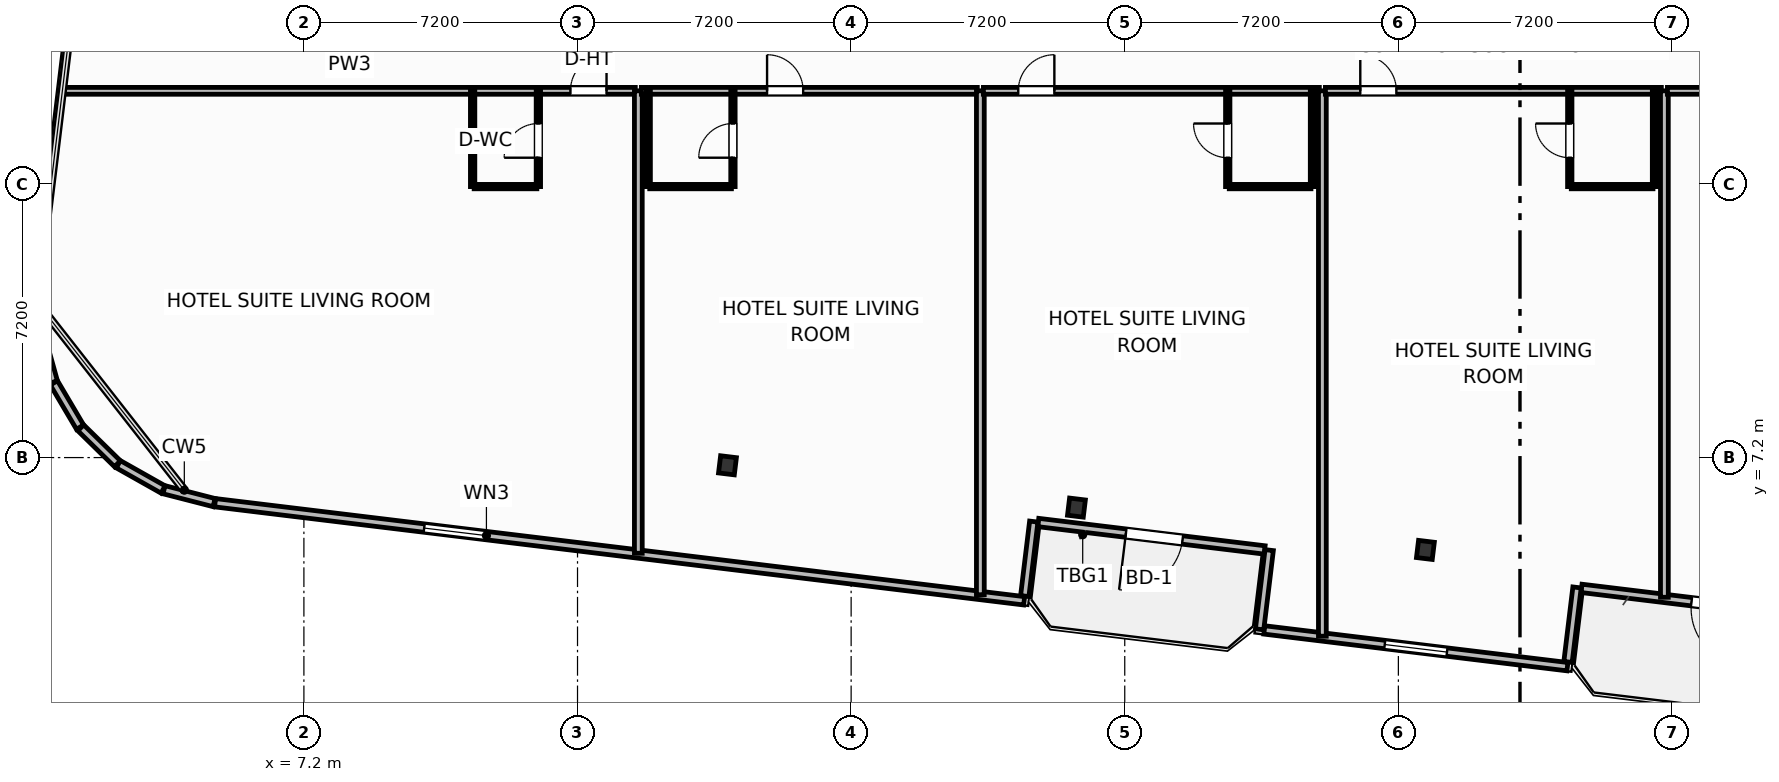
"""IFC4 building model, lengths in metres.
Left out: names, types, materials, properties, quantities, classifications, styles, units other than length and angle.
Written with IfcOpenShell. Run it as: python <this file> out.ifc"""

import sys

from ifc_helpers import new_model, si_unit, direction, frame, frame_2d, origin, origin_2d, place, context, subcontext, project, spatial, rectangle, i_section, extrude, element, fill, save


model = new_model("IFC4")
c1 = context("Model", 3, precision=1e-05, world=origin(), true_north=direction((0.0, 1.0)))
c2 = subcontext(c1, "Body", "Model", "MODEL_VIEW")
j1 = project(units=[si_unit("LENGTHUNIT", "METRE"), si_unit("PLANEANGLEUNIT", "RADIAN")], contexts=[c1])
p1 = place(None, origin())
s1 = spatial("IfcSite", under=j1, at=p1, CompositionType="ELEMENT")
p2 = place(p1, origin())
s2 = spatial("IfcBuilding", under=s1, at=p2, CompositionType="ELEMENT")
p3 = place(p2, frame((0.0, 0.0, 151.3)))
s3 = spatial("IfcBuildingStorey", under=s2, at=p3, CompositionType="ELEMENT", Elevation=151.3)
for number, where, z_axis, x_axis in (
    (1, (18.346, 6.997, 0.0), (0.0, 0.0, 1.0), (0.993, -0.12, 0.0)),
    (2, (27.529, 5.884, 0.0), (0.0, 0.0, 1.0), (0.993, -0.12, 0.0)),
    (3, (36.711, 4.77, 0.0), (0.0, 0.0, 1.0), (0.993, -0.12, 0.0)),
):
    element("IfcColumn", number, at=place(p3, frame(where, z_axis=z_axis, x_axis=x_axis)), inside=s3, PredefinedType="COLUMN", context=c2, shape_type="SweptSolid", body=[
        extrude(i_section(OverallWidth=0.418, OverallDepth=0.455, WebThickness=0.042, FlangeThickness=0.068, FilletRadius=0.025, at=origin_2d()), origin(), (0.0, 0.0, 1.0), 3.7),
    ])
p4 = place(p3, frame((32.48, 4.77, 0.0), z_axis=(0.0, 0.0, 1.0), x_axis=(-0.992735402148, 0.120318000826, 0.0)))
e4 = element("IfcWall", 4, at=p4, inside=s3, PredefinedType="SOLIDWALL", context=c2, shape_type="SweptSolid", body=[
    extrude(rectangle(XDim=6.0, YDim=0.22, at=frame_2d((3.0, 0.0))), origin(), (0.0, 0.0, 1.0), 2.73),
])
p5 = place(p4, frame((2.176, 0.0, 0.0)))
e5 = element("IfcOpeningElement", 5, at=p5, cuts=e4, PredefinedType="OPENING", context=c2, shape_type="SweptSolid", body=[
    extrude(rectangle(XDim=1.5, YDim=2.25, at=frame_2d((0.75, 1.125))), frame((0.0, 0.12, 0.0), z_axis=(0.0, -1.0, 0.0), x_axis=(1.0, 0.0, 0.0)), (0.0, 0.0, 1.0), 0.24),
])
p6 = place(p3, frame((46.776, 3.037, 0.0), z_axis=(0.0, 0.0, 1.0), x_axis=(-0.992735402148, 0.120318000826, 0.0)))
e6 = element("IfcWall", 6, at=p6, inside=s3, PredefinedType="SOLIDWALL", context=c2, shape_type="SweptSolid", body=[
    extrude(rectangle(XDim=6.0, YDim=0.22, at=frame_2d((3.0, 0.0))), origin(), (0.0, 0.0, 1.0), 2.73),
])
p7 = place(p6, frame((1.584, 0.0, 0.0)))
e7 = element("IfcOpeningElement", 7, at=p7, cuts=e6, PredefinedType="OPENING", context=c2, shape_type="SweptSolid", body=[
    extrude(rectangle(XDim=1.5, YDim=2.25, at=frame_2d((0.75, 1.125))), frame((0.0, 0.12, 0.0), z_axis=(0.0, -1.0, 0.0), x_axis=(1.0, 0.0, 0.0)), (0.0, 0.0, 1.0), 0.24),
])
p8 = place(p3, frame((0.245, 10.491, 0.0), z_axis=(0.0, 0.0, 1.0), x_axis=(0.268853470153, -0.963181089716, 0.0)))
e8 = element("IfcWall", 8, at=p8, inside=s3, PredefinedType="SOLIDWALL", context=c2, shape_type="SweptSolid", body=[
    extrude(rectangle(XDim=1.353, YDim=0.22, at=frame_2d((0.677, 0.0))), origin(), (0.0, 0.0, 1.0), 2.73),
])
p9 = place(p3, frame((0.622, 9.166, 0.0), z_axis=(0.0, 0.0, 1.0), x_axis=(0.508911700393, -0.860818727261, 0.0)))
e9 = element("IfcWall", 9, at=p9, inside=s3, PredefinedType="SOLIDWALL", context=c2, shape_type="SweptSolid", body=[
    extrude(rectangle(XDim=1.353, YDim=0.22, at=frame_2d((0.676, 0.0))), origin(), (0.0, 0.0, 1.0), 2.73),
])
p10 = place(p3, frame((1.328, 7.984, 0.0), z_axis=(0.0, 0.0, 1.0), x_axis=(0.714376989847, -0.69976104234, 0.0)))
e10 = element("IfcWall", 10, at=p10, inside=s3, PredefinedType="SOLIDWALL", context=c2, shape_type="SweptSolid", body=[
    extrude(rectangle(XDim=1.353, YDim=0.22, at=frame_2d((0.677, 0.0))), origin(), (0.0, 0.0, 1.0), 2.73),
])
p11 = place(p3, frame((2.316, 7.025, 0.0), z_axis=(0.0, 0.0, 1.0), x_axis=(0.87113677592, -0.491040443996, 0.0)))
e11 = element("IfcWall", 11, at=p11, inside=s3, PredefinedType="SOLIDWALL", context=c2, shape_type="SweptSolid", body=[
    extrude(rectangle(XDim=1.353, YDim=0.22, at=frame_2d((0.677, 0.0))), origin(), (0.0, 0.0, 1.0), 2.73),
])
p12 = place(p3, frame((3.519, 6.354, 0.0), z_axis=(0.0, 0.0, 1.0), x_axis=(0.968506529347, -0.248988157573, 0.0)))
e12 = element("IfcWall", 12, at=p12, inside=s3, PredefinedType="SOLIDWALL", context=c2, shape_type="SweptSolid", body=[
    extrude(rectangle(XDim=1.361, YDim=0.22, at=frame_2d((0.681, 0.0))), origin(), (0.0, 0.0, 1.0), 2.73),
])
p13 = place(p3, frame((4.862, 6.012, 0.0), z_axis=(0.0, 0.0, 1.0), x_axis=(0.99273213367, -0.120344965739, 0.0)))
e13 = element("IfcWall", 13, at=p13, inside=s3, PredefinedType="SOLIDWALL", context=c2, shape_type="SweptSolid", body=[
    extrude(rectangle(XDim=21.447, YDim=0.22, at=frame_2d((10.724, 0.0))), origin(), (0.0, 0.0, 1.0), 2.73),
])
p14 = place(p13, frame((5.543, 0.0, 0.8)))
e14 = element("IfcOpeningElement", 14, at=p14, cuts=e13, PredefinedType="OPENING", context=c2, shape_type="SweptSolid", body=[
    extrude(rectangle(XDim=1.65, YDim=1.65, at=frame_2d((0.825, 0.825))), frame((0.0, 0.12, 0.0), z_axis=(0.0, -1.0, 0.0), x_axis=(1.0, 0.0, 0.0)), (0.0, 0.0, 1.0), 0.24),
])
p15 = place(p3, frame((26.168, 3.555, 0.0), z_axis=(0.0, 0.0, 1.0), x_axis=(0.120290754542, 0.992738703976, 0.0)))
e15 = element("IfcWall", 15, at=p15, inside=s3, PredefinedType="SOLIDWALL", context=c2, shape_type="SweptSolid", body=[
    extrude(rectangle(XDim=1.975, YDim=0.22, at=frame_2d((0.987, 0.0))), origin(), (0.0, 0.0, 1.0), 2.73),
])
p16 = place(p3, frame((32.601, 4.765, 0.0), z_axis=(0.0, 0.0, 1.0), x_axis=(-0.120327895535, -0.992734202874, 0.0)))
e16 = element("IfcWall", 16, at=p16, inside=s3, PredefinedType="SOLIDWALL", context=c2, shape_type="SweptSolid", body=[
    extrude(rectangle(XDim=2.1, YDim=0.22, at=frame_2d((1.05, 0.0))), origin(), (0.0, 0.0, 1.0), 2.73),
])
p17 = place(p3, frame((32.472, 2.665, 0.0), z_axis=(0.0, 0.0, 1.0), x_axis=(0.992734661931, -0.120324108143, 0.0)))
e17 = element("IfcWall", 17, at=p17, inside=s3, PredefinedType="SOLIDWALL", context=c2, shape_type="SweptSolid", body=[
    extrude(rectangle(XDim=8.035, YDim=0.22, at=frame_2d((4.018, 0.0))), origin(), (0.0, 0.0, 1.0), 2.73),
])
p18 = place(p17, frame((3.192, 0.0, 0.8)))
e18 = element("IfcOpeningElement", 18, at=p18, cuts=e17, PredefinedType="OPENING", context=c2, shape_type="SweptSolid", body=[
    extrude(rectangle(XDim=1.65, YDim=1.65, at=frame_2d((0.825, 0.825))), frame((0.0, 0.12, 0.0), z_axis=(0.0, -1.0, 0.0), x_axis=(1.0, 0.0, 0.0)), (0.0, 0.0, 1.0), 0.24),
])
p19 = place(p3, frame((40.464, 1.822, 0.0), z_axis=(0.0, 0.0, 1.0), x_axis=(0.120275992932, 0.992740492538, 0.0)))
e19 = element("IfcWall", 19, at=p19, inside=s3, PredefinedType="SOLIDWALL", context=c2, shape_type="SweptSolid", body=[
    extrude(rectangle(XDim=1.975, YDim=0.22, at=frame_2d((0.988, 0.0))), origin(), (0.0, 0.0, 1.0), 2.73),
])
p20 = place(p3, frame((0.884, 16.85, 0.0), z_axis=(0.0, 0.0, 1.0), x_axis=(1.0, 0.0, 0.0)))
e20 = element("IfcWall", 20, at=p20, inside=s3, PredefinedType="PARTITIONING", context=c2, shape_type="SweptSolid", body=[
    extrude(rectangle(XDim=15.036, YDim=0.18, at=frame_2d((7.518, 0.0))), origin(), (0.0, 0.0, 1.0), 3.45),
])
p21 = place(p20, frame((13.329, 0.0, 0.0)))
e21 = element("IfcOpeningElement", 21, at=p21, cuts=e20, PredefinedType="OPENING", context=c2, shape_type="SweptSolid", body=[
    extrude(rectangle(XDim=0.95, YDim=2.15, at=frame_2d((0.475, 1.075))), frame((0.0, 0.1, 0.0), z_axis=(0.0, -1.0, 0.0), x_axis=(1.0, 0.0, 0.0)), (0.0, 0.0, 1.0), 0.2),
])
p22 = place(p3, frame((11.68, 14.33, 0.0), z_axis=(0.0, 0.0, 1.0), x_axis=(1.0, 0.0, 0.0)))
e22 = element("IfcWall", 22, at=p22, inside=s3, PredefinedType="PARTITIONING", context=c2, shape_type="SweptSolid", body=[
    extrude(rectangle(XDim=1.65, YDim=0.115, at=frame_2d((0.825, 0.0))), origin(), (0.0, 0.0, 1.0), 3.45),
])
p23 = place(p3, frame((13.37, 14.33, 0.0), z_axis=(0.0, 0.0, 1.0), x_axis=(0.0, 1.0, 0.0)))
e23 = element("IfcWall", 23, at=p23, inside=s3, PredefinedType="PARTITIONING", context=c2, shape_type="SweptSolid", body=[
    extrude(rectangle(XDim=2.52, YDim=0.115, at=frame_2d((1.26, 0.0))), origin(), (0.0, 0.0, 1.0), 3.45),
])
p24 = place(p23, frame((0.76, 0.0, 0.0)))
e24 = element("IfcOpeningElement", 24, at=p24, cuts=e23, PredefinedType="OPENING", context=c2, shape_type="SweptSolid", body=[
    extrude(rectangle(XDim=0.9, YDim=2.05, at=frame_2d((0.45, 1.025))), frame((0.0, 0.067, 0.0), z_axis=(0.0, -1.0, 0.0), x_axis=(1.0, 0.0, 0.0)), (0.0, 0.0, 1.0), 0.135),
])
p25 = place(p3, frame((11.64, 14.33, 0.0), z_axis=(0.0, 0.0, 1.0), x_axis=(0.0, 1.0, 0.0)))
e25 = element("IfcWall", 25, at=p25, inside=s3, PredefinedType="PARTITIONING", context=c2, shape_type="SweptSolid", body=[
    extrude(rectangle(XDim=2.52, YDim=0.115, at=frame_2d((1.26, 0.0))), origin(), (0.0, 0.0, 1.0), 3.45),
])
p26 = place(p3, frame((16.0, 4.682, 0.0), z_axis=(0.0, 0.0, 1.0), x_axis=(0.0, 1.0, 0.0)))
e26 = element("IfcWall", 26, at=p26, inside=s3, PredefinedType="PARTITIONING", context=c2, shape_type="SweptSolid", body=[
    extrude(rectangle(XDim=12.168, YDim=0.205, at=frame_2d((6.084, 0.0))), origin(), (0.0, 0.0, 1.0), 3.45),
])
p27 = place(p3, frame((16.08, 16.85, 0.0), z_axis=(0.0, 0.0, 1.0), x_axis=(1.0, 0.0, 0.0)))
e27 = element("IfcWall", 27, at=p27, inside=s3, PredefinedType="PARTITIONING", context=c2, shape_type="SweptSolid", body=[
    extrude(rectangle(XDim=8.84, YDim=0.18, at=frame_2d((4.42, 0.0))), origin(), (0.0, 0.0, 1.0), 3.45),
])
p28 = place(p27, frame((3.308, 0.0, 0.0)))
e28 = element("IfcOpeningElement", 28, at=p28, cuts=e27, PredefinedType="OPENING", context=c2, shape_type="SweptSolid", body=[
    extrude(rectangle(XDim=0.95, YDim=2.15, at=frame_2d((0.475, 1.075))), frame((0.0, 0.1, 0.0), z_axis=(0.0, -1.0, 0.0), x_axis=(1.0, 0.0, 0.0)), (0.0, 0.0, 1.0), 0.2),
])
p29 = place(p3, frame((16.3, 14.33, 0.0), z_axis=(0.0, 0.0, 1.0), x_axis=(1.0, 0.0, 0.0)))
e29 = element("IfcWall", 29, at=p29, inside=s3, PredefinedType="PARTITIONING", context=c2, shape_type="SweptSolid", body=[
    extrude(rectangle(XDim=2.15, YDim=0.115, at=frame_2d((1.075, 0.0))), origin(), (0.0, 0.0, 1.0), 3.45),
])
p30 = place(p3, frame((18.49, 14.33, 0.0), z_axis=(0.0, 0.0, 1.0), x_axis=(0.0, 1.0, 0.0)))
e30 = element("IfcWall", 30, at=p30, inside=s3, PredefinedType="PARTITIONING", context=c2, shape_type="SweptSolid", body=[
    extrude(rectangle(XDim=2.52, YDim=0.115, at=frame_2d((1.26, 0.0))), origin(), (0.0, 0.0, 1.0), 3.45),
])
p31 = place(p30, frame((0.76, 0.0, 0.0)))
e31 = element("IfcOpeningElement", 31, at=p31, cuts=e30, PredefinedType="OPENING", context=c2, shape_type="SweptSolid", body=[
    extrude(rectangle(XDim=0.9, YDim=2.05, at=frame_2d((0.45, 1.025))), frame((0.0, 0.067, 0.0), z_axis=(0.0, -1.0, 0.0), x_axis=(1.0, 0.0, 0.0)), (0.0, 0.0, 1.0), 0.135),
])
p32 = place(p3, frame((16.26, 14.33, 0.0), z_axis=(0.0, 0.0, 1.0), x_axis=(0.0, 1.0, 0.0)))
e32 = element("IfcWall", 32, at=p32, inside=s3, PredefinedType="PARTITIONING", context=c2, shape_type="SweptSolid", body=[
    extrude(rectangle(XDim=2.52, YDim=0.115, at=frame_2d((1.26, 0.0))), origin(), (0.0, 0.0, 1.0), 3.45),
])
p33 = place(p3, frame((25.0, 3.591, 0.0), z_axis=(0.0, 0.0, 1.0), x_axis=(0.0, 1.0, 0.0)))
e33 = element("IfcWall", 33, at=p33, inside=s3, PredefinedType="PARTITIONING", context=c2, shape_type="SweptSolid", body=[
    extrude(rectangle(XDim=13.259, YDim=0.205, at=frame_2d((6.629, 0.0))), origin(), (0.0, 0.0, 1.0), 2.662),
])
p34 = place(p3, frame((25.08, 16.85, 0.0), z_axis=(0.0, 0.0, 1.0), x_axis=(1.0, 0.0, 0.0)))
e34 = element("IfcWall", 34, at=p34, inside=s3, PredefinedType="PARTITIONING", context=c2, shape_type="SweptSolid", body=[
    extrude(rectangle(XDim=8.84, YDim=0.18, at=frame_2d((4.42, 0.0))), origin(), (0.0, 0.0, 1.0), 3.45),
])
p35 = place(p34, frame((0.918, 0.0, 0.0)))
e35 = element("IfcOpeningElement", 35, at=p35, cuts=e34, PredefinedType="OPENING", context=c2, shape_type="SweptSolid", body=[
    extrude(rectangle(XDim=0.95, YDim=2.15, at=frame_2d((0.475, 1.075))), frame((0.0, 0.1, 0.0), z_axis=(0.0, -1.0, 0.0), x_axis=(1.0, 0.0, 0.0)), (0.0, 0.0, 1.0), 0.2),
])
p36 = place(p3, frame((31.55, 14.33, 0.0), z_axis=(0.0, 0.0, 1.0), x_axis=(1.0, 0.0, 0.0)))
e36 = element("IfcWall", 36, at=p36, inside=s3, PredefinedType="PARTITIONING", context=c2, shape_type="SweptSolid", body=[
    extrude(rectangle(XDim=2.15, YDim=0.115, at=frame_2d((1.075, 0.0))), origin(), (0.0, 0.0, 1.0), 3.45),
])
p37 = place(p3, frame((31.51, 14.33, 0.0), z_axis=(0.0, 0.0, 1.0), x_axis=(0.0, 1.0, 0.0)))
e37 = element("IfcWall", 37, at=p37, inside=s3, PredefinedType="PARTITIONING", context=c2, shape_type="SweptSolid", body=[
    extrude(rectangle(XDim=2.52, YDim=0.115, at=frame_2d((1.26, 0.0))), origin(), (0.0, 0.0, 1.0), 3.45),
])
p38 = place(p37, frame((0.76, 0.0, 0.0)))
e38 = element("IfcOpeningElement", 38, at=p38, cuts=e37, PredefinedType="OPENING", context=c2, shape_type="SweptSolid", body=[
    extrude(rectangle(XDim=0.9, YDim=2.05, at=frame_2d((0.45, 1.025))), frame((0.0, 0.067, 0.0), z_axis=(0.0, -1.0, 0.0), x_axis=(1.0, 0.0, 0.0)), (0.0, 0.0, 1.0), 0.135),
])
p39 = place(p3, frame((33.74, 14.33, 0.0), z_axis=(0.0, 0.0, 1.0), x_axis=(0.0, 1.0, 0.0)))
e39 = element("IfcWall", 39, at=p39, inside=s3, PredefinedType="PARTITIONING", context=c2, shape_type="SweptSolid", body=[
    extrude(rectangle(XDim=2.52, YDim=0.115, at=frame_2d((1.26, 0.0))), origin(), (0.0, 0.0, 1.0), 3.45),
])
p40 = place(p3, frame((34.0, 2.5, 0.0), z_axis=(0.0, 0.0, 1.0), x_axis=(0.0, 1.0, 0.0)))
e40 = element("IfcWall", 40, at=p40, inside=s3, PredefinedType="PARTITIONING", context=c2, shape_type="SweptSolid", body=[
    extrude(rectangle(XDim=14.35, YDim=0.205, at=frame_2d((7.175, 0.0))), origin(), (0.0, 0.0, 1.0), 3.45),
])
p41 = place(p3, frame((34.08, 16.85, 0.0), z_axis=(0.0, 0.0, 1.0), x_axis=(1.0, 0.0, 0.0)))
e41 = element("IfcWall", 41, at=p41, inside=s3, PredefinedType="PARTITIONING", context=c2, shape_type="SweptSolid", body=[
    extrude(rectangle(XDim=8.84, YDim=0.18, at=frame_2d((4.42, 0.0))), origin(), (0.0, 0.0, 1.0), 3.45),
])
p42 = place(p41, frame((0.918, 0.0, 0.0)))
e42 = element("IfcOpeningElement", 42, at=p42, cuts=e41, PredefinedType="OPENING", context=c2, shape_type="SweptSolid", body=[
    extrude(rectangle(XDim=0.95, YDim=2.15, at=frame_2d((0.475, 1.075))), frame((0.0, 0.1, 0.0), z_axis=(0.0, -1.0, 0.0), x_axis=(1.0, 0.0, 0.0)), (0.0, 0.0, 1.0), 0.2),
])
p43 = place(p3, frame((40.55, 14.33, 0.0), z_axis=(0.0, 0.0, 1.0), x_axis=(1.0, 0.0, 0.0)))
e43 = element("IfcWall", 43, at=p43, inside=s3, PredefinedType="PARTITIONING", context=c2, shape_type="SweptSolid", body=[
    extrude(rectangle(XDim=2.15, YDim=0.115, at=frame_2d((1.075, 0.0))), origin(), (0.0, 0.0, 1.0), 3.45),
])
p44 = place(p3, frame((40.51, 14.33, 0.0), z_axis=(0.0, 0.0, 1.0), x_axis=(0.0, 1.0, 0.0)))
e44 = element("IfcWall", 44, at=p44, inside=s3, PredefinedType="PARTITIONING", context=c2, shape_type="SweptSolid", body=[
    extrude(rectangle(XDim=2.52, YDim=0.115, at=frame_2d((1.26, 0.0))), origin(), (0.0, 0.0, 1.0), 3.45),
])
p45 = place(p44, frame((0.76, 0.0, 0.0)))
e45 = element("IfcOpeningElement", 45, at=p45, cuts=e44, PredefinedType="OPENING", context=c2, shape_type="SweptSolid", body=[
    extrude(rectangle(XDim=0.9, YDim=2.05, at=frame_2d((0.45, 1.025))), frame((0.0, 0.067, 0.0), z_axis=(0.0, -1.0, 0.0), x_axis=(1.0, 0.0, 0.0)), (0.0, 0.0, 1.0), 0.135),
])
p46 = place(p3, frame((42.74, 14.33, 0.0), z_axis=(0.0, 0.0, 1.0), x_axis=(0.0, 1.0, 0.0)))
e46 = element("IfcWall", 46, at=p46, inside=s3, PredefinedType="PARTITIONING", context=c2, shape_type="SweptSolid", body=[
    extrude(rectangle(XDim=2.52, YDim=0.115, at=frame_2d((1.26, 0.0))), origin(), (0.0, 0.0, 1.0), 3.45),
])
p47 = place(p3, frame((43.0, 3.524, 0.0), z_axis=(0.0, 0.0, 1.0), x_axis=(0.0, 1.0, 0.0)))
e47 = element("IfcWall", 47, at=p47, inside=s3, PredefinedType="PARTITIONING", context=c2, shape_type="SweptSolid", body=[
    extrude(rectangle(XDim=13.326, YDim=0.205, at=frame_2d((6.663, 0.0))), origin(), (0.0, 0.0, 1.0), 3.45),
])
p48 = place(p3, frame((43.08, 16.85, 0.0), z_axis=(0.0, 0.0, 1.0), x_axis=(1.0, 0.0, 0.0)))
e48 = element("IfcWall", 48, at=p48, inside=s3, PredefinedType="PARTITIONING", context=c2, shape_type="SweptSolid", body=[
    extrude(rectangle(XDim=8.84, YDim=0.18, at=frame_2d((4.42, 0.0))), origin(), (0.0, 0.0, 1.0), 3.45),
])
p49 = place(p48, frame((0.918, 0.0, 0.0)))
e49 = element("IfcOpeningElement", 49, at=p49, cuts=e48, PredefinedType="OPENING", context=c2, shape_type="SweptSolid", body=[
    extrude(rectangle(XDim=0.95, YDim=2.15, at=frame_2d((0.475, 1.075))), frame((0.0, 0.1, 0.0), z_axis=(0.0, -1.0, 0.0), x_axis=(1.0, 0.0, 0.0)), (0.0, 0.0, 1.0), 0.2),
])
p50 = place(p5, origin())
e50 = element("IfcDoor", 50, at=p50, inside=s3, OperationType="SINGLE_SWING_RIGHT", PredefinedType="DOOR", context=c2, shape_type="SweptSolid", body=[
    extrude(rectangle(XDim=1.5, YDim=2.25, at=frame_2d((0.75, 1.125))), frame((0.0, 0.025, 0.0), z_axis=(0.0, -1.0, 0.0), x_axis=(1.0, 0.0, 0.0)), (0.0, 0.0, 1.0), 0.05),
])
fill(e5, e50)
p51 = place(p7, origin())
e51 = element("IfcDoor", 51, at=p51, inside=s3, OperationType="SINGLE_SWING_LEFT", PredefinedType="DOOR", context=c2, shape_type="SweptSolid", body=[
    extrude(rectangle(XDim=1.5, YDim=2.25, at=frame_2d((0.75, 1.125))), frame((0.0, 0.025, 0.0), z_axis=(0.0, -1.0, 0.0), x_axis=(1.0, 0.0, 0.0)), (0.0, 0.0, 1.0), 0.05),
])
fill(e7, e51)
p52 = place(p14, origin())
e52 = element("IfcWindow", 52, at=p52, inside=s3, PartitioningType="SINGLE_PANEL", PredefinedType="WINDOW", context=c2, shape_type="SweptSolid", body=[
    extrude(rectangle(XDim=1.65, YDim=1.65, at=frame_2d((0.825, 0.825))), frame((0.0, 0.03, 0.0), z_axis=(0.0, -1.0, 0.0), x_axis=(1.0, 0.0, 0.0)), (0.0, 0.0, 1.0), 0.06),
])
fill(e14, e52)
p53 = place(p18, origin())
e53 = element("IfcWindow", 53, at=p53, inside=s3, PartitioningType="SINGLE_PANEL", PredefinedType="WINDOW", context=c2, shape_type="SweptSolid", body=[
    extrude(rectangle(XDim=1.65, YDim=1.65, at=frame_2d((0.825, 0.825))), frame((0.0, 0.03, 0.0), z_axis=(0.0, -1.0, 0.0), x_axis=(1.0, 0.0, 0.0)), (0.0, 0.0, 1.0), 0.06),
])
fill(e18, e53)
p54 = place(p21, origin())
e54 = element("IfcDoor", 54, at=p54, inside=s3, OperationType="SINGLE_SWING_RIGHT", PredefinedType="DOOR", context=c2, shape_type="SweptSolid", body=[
    extrude(rectangle(XDim=0.95, YDim=2.15, at=frame_2d((0.475, 1.075))), frame((0.0, 0.025, 0.0), z_axis=(0.0, -1.0, 0.0), x_axis=(1.0, 0.0, 0.0)), (0.0, 0.0, 1.0), 0.05),
])
fill(e21, e54)
p55 = place(p24, origin())
e55 = element("IfcDoor", 55, at=p55, inside=s3, OperationType="SINGLE_SWING_LEFT", PredefinedType="DOOR", context=c2, shape_type="SweptSolid", body=[
    extrude(rectangle(XDim=0.9, YDim=2.05, at=frame_2d((0.45, 1.025))), frame((0.0, 0.025, 0.0), z_axis=(0.0, -1.0, 0.0), x_axis=(1.0, 0.0, 0.0)), (0.0, 0.0, 1.0), 0.05),
])
fill(e24, e55)
p56 = place(p28, origin())
e56 = element("IfcDoor", 56, at=p56, inside=s3, OperationType="SINGLE_SWING_LEFT", PredefinedType="DOOR", context=c2, shape_type="SweptSolid", body=[
    extrude(rectangle(XDim=0.95, YDim=2.15, at=frame_2d((0.475, 1.075))), frame((0.0, 0.025, 0.0), z_axis=(0.0, -1.0, 0.0), x_axis=(1.0, 0.0, 0.0)), (0.0, 0.0, 1.0), 0.05),
])
fill(e28, e56)
p57 = place(p31, origin())
e57 = element("IfcDoor", 57, at=p57, inside=s3, OperationType="SINGLE_SWING_LEFT", PredefinedType="DOOR", context=c2, shape_type="SweptSolid", body=[
    extrude(rectangle(XDim=0.9, YDim=2.05, at=frame_2d((0.45, 1.025))), frame((0.0, 0.025, 0.0), z_axis=(0.0, -1.0, 0.0), x_axis=(1.0, 0.0, 0.0)), (0.0, 0.0, 1.0), 0.05),
])
fill(e31, e57)
p58 = place(p35, origin())
e58 = element("IfcDoor", 58, at=p58, inside=s3, OperationType="SINGLE_SWING_RIGHT", PredefinedType="DOOR", context=c2, shape_type="SweptSolid", body=[
    extrude(rectangle(XDim=0.95, YDim=2.15, at=frame_2d((0.475, 1.075))), frame((0.0, 0.025, 0.0), z_axis=(0.0, -1.0, 0.0), x_axis=(1.0, 0.0, 0.0)), (0.0, 0.0, 1.0), 0.05),
])
fill(e35, e58)
p59 = place(p38, origin())
e59 = element("IfcDoor", 59, at=p59, inside=s3, OperationType="SINGLE_SWING_RIGHT", PredefinedType="DOOR", context=c2, shape_type="SweptSolid", body=[
    extrude(rectangle(XDim=0.9, YDim=2.05, at=frame_2d((0.45, 1.025))), frame((0.0, 0.025, 0.0), z_axis=(0.0, -1.0, 0.0), x_axis=(1.0, 0.0, 0.0)), (0.0, 0.0, 1.0), 0.05),
])
fill(e38, e59)
p60 = place(p42, origin())
e60 = element("IfcDoor", 60, at=p60, inside=s3, OperationType="SINGLE_SWING_LEFT", PredefinedType="DOOR", context=c2, shape_type="SweptSolid", body=[
    extrude(rectangle(XDim=0.95, YDim=2.15, at=frame_2d((0.475, 1.075))), frame((0.0, 0.025, 0.0), z_axis=(0.0, -1.0, 0.0), x_axis=(1.0, 0.0, 0.0)), (0.0, 0.0, 1.0), 0.05),
])
fill(e42, e60)
p61 = place(p45, origin())
e61 = element("IfcDoor", 61, at=p61, inside=s3, OperationType="SINGLE_SWING_RIGHT", PredefinedType="DOOR", context=c2, shape_type="SweptSolid", body=[
    extrude(rectangle(XDim=0.9, YDim=2.05, at=frame_2d((0.45, 1.025))), frame((0.0, 0.025, 0.0), z_axis=(0.0, -1.0, 0.0), x_axis=(1.0, 0.0, 0.0)), (0.0, 0.0, 1.0), 0.05),
])
fill(e45, e61)
save(model, sys.argv[1])
